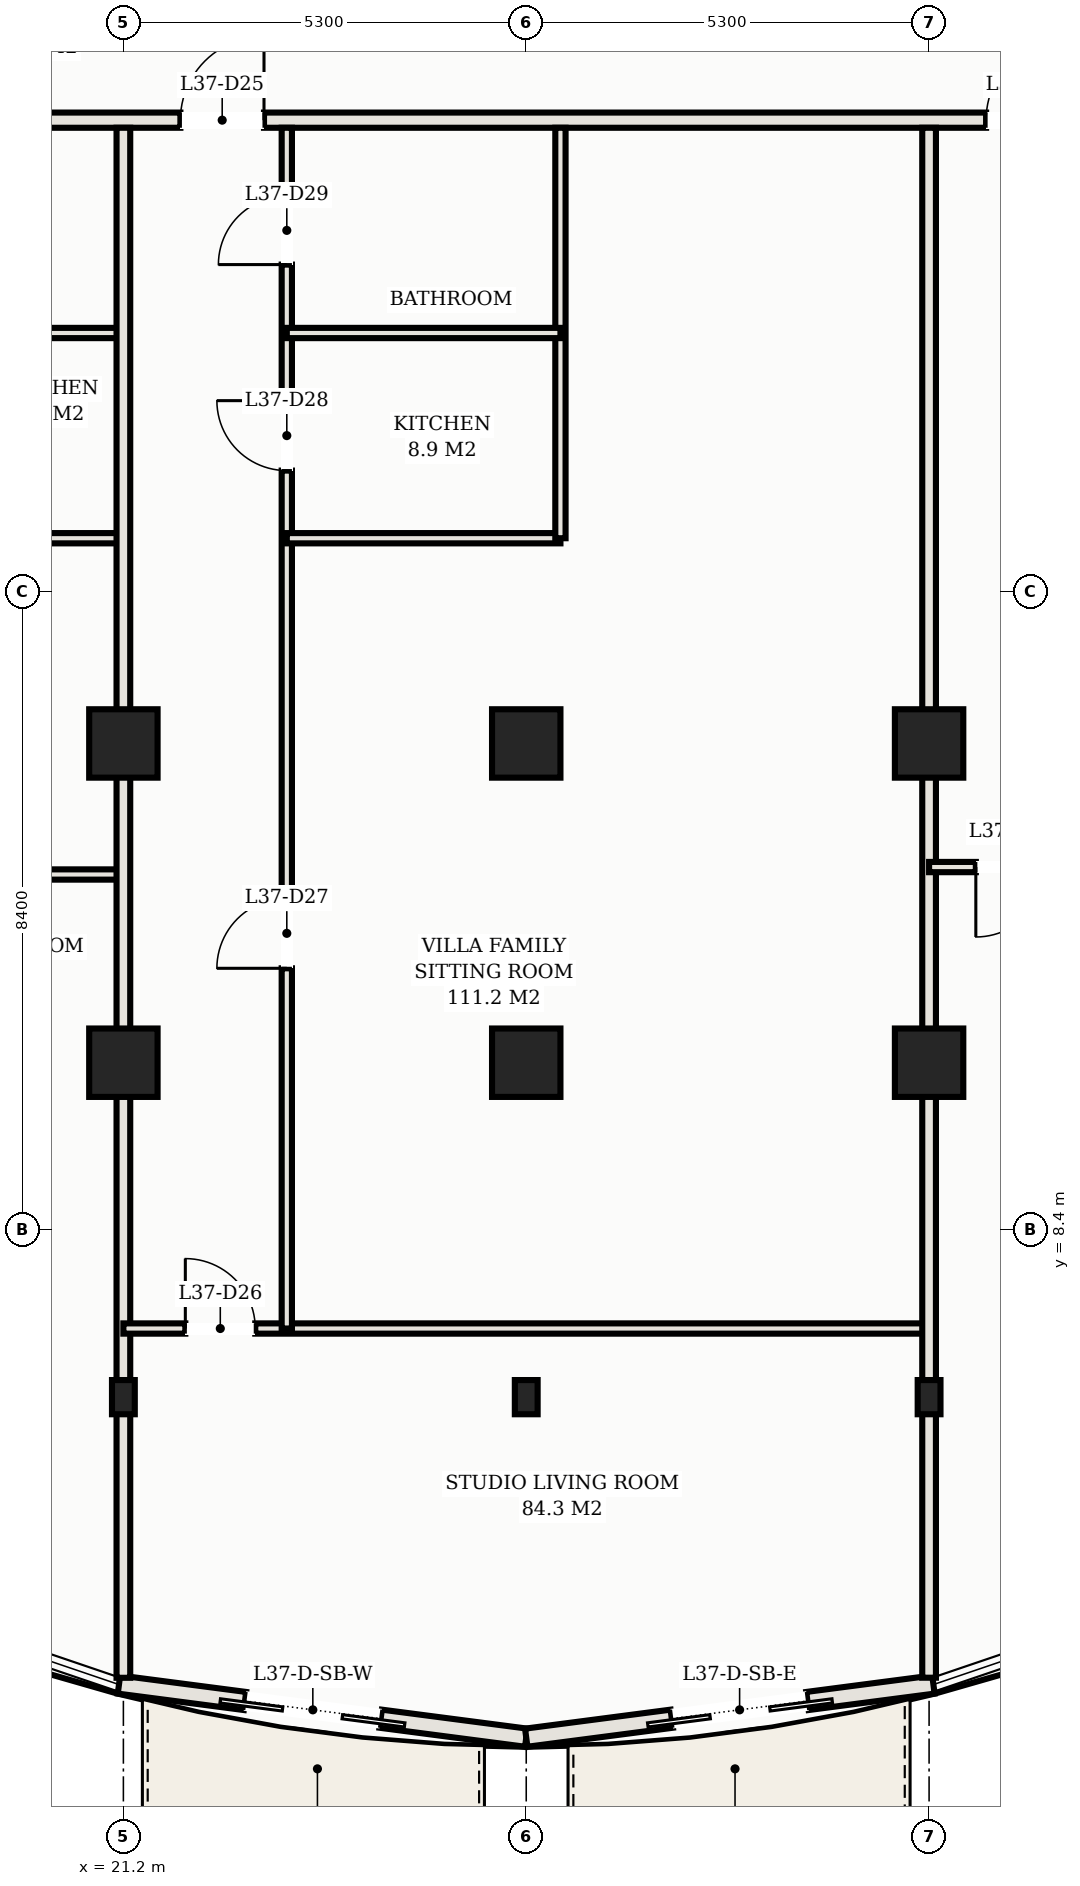
"""IFC4 building model, lengths in metres.
Left out: names, types, materials, properties, quantities, classifications, styles, units other than length and angle.
Written with IfcOpenShell. Run it as: python <this file> out.ifc"""

import sys

from ifc_helpers import new_model, si_unit, direction, frame, frame_2d, origin, origin_2d, place, context, subcontext, project, spatial, rectangle, hollow_rectangle, extrude, element, fill, save


model = new_model("IFC4")
c1 = context("Model", 3, precision=1e-05, world=origin(), true_north=direction((0.0, 1.0)))
c2 = subcontext(c1, "Body", "Model", "MODEL_VIEW")
j1 = project(units=[si_unit("LENGTHUNIT", "METRE"), si_unit("PLANEANGLEUNIT", "RADIAN")], contexts=[c1])
p1 = place(None, origin())
s1 = spatial("IfcSite", under=j1, at=p1, CompositionType="ELEMENT")
p2 = place(p1, origin())
s2 = spatial("IfcBuilding", under=s1, at=p2, CompositionType="ELEMENT")
p3 = place(p2, frame((0.0, 0.0, 139.2)))
s3 = spatial("IfcBuildingStorey", under=s2, at=p3, CompositionType="ELEMENT", Elevation=139.2)
for number, where, z_axis, x_axis in (
    (1, (21.2, 14.8, 0.0), (0.0, 0.0, 1.0), (1.0, 0.0, 0.0)),
    (2, (21.2, 10.6, 0.0), (0.0, 0.0, 1.0), (1.0, 0.0, 0.0)),
    (3, (26.5, 14.8, 0.0), (0.0, 0.0, 1.0), (1.0, 0.0, 0.0)),
    (4, (26.5, 10.6, 0.0), (0.0, 0.0, 1.0), (1.0, 0.0, 0.0)),
    (5, (31.8, 14.8, 0.0), (0.0, 0.0, 1.0), (1.0, 0.0, 0.0)),
    (6, (31.8, 10.6, 0.0), (0.0, 0.0, 1.0), (1.0, 0.0, 0.0)),
):
    element("IfcColumn", number, at=place(p3, frame(where, z_axis=z_axis, x_axis=x_axis)), inside=s3, PredefinedType="COLUMN", context=c2, shape_type="SweptSolid", body=[
        extrude(hollow_rectangle(XDim=0.9, YDim=0.9, WallThickness=0.032, at=origin_2d()), origin(), (0.0, 0.0, 1.0), 3.3),
    ])
for number, where, z_axis, x_axis in (
    (7, (21.2, 6.2, 0.0), (0.0, 0.0, 1.0), (1.0, 0.0, 0.0)),
    (8, (26.5, 6.2, 0.0), (0.0, 0.0, 1.0), (1.0, 0.0, 0.0)),
    (9, (31.8, 6.2, 0.0), (0.0, 0.0, 1.0), (1.0, 0.0, 0.0)),
):
    element("IfcColumn", number, at=place(p3, frame(where, z_axis=z_axis, x_axis=x_axis)), inside=s3, PredefinedType="COLUMN", context=c2, shape_type="SweptSolid", body=[
        extrude(hollow_rectangle(XDim=0.3, YDim=0.45, WallThickness=0.016, at=origin_2d()), origin(), (0.0, 0.0, 1.0), 3.3),
    ])
p4 = place(p3, frame((21.142, 2.419, 0.0), z_axis=(0.0, 0.0, 1.0), x_axis=(0.991597639478, -0.129360432053, 0.0)))
e10 = element("IfcWall", 10, at=p4, inside=s3, PredefinedType="SOLIDWALL", context=c2, shape_type="SweptSolid", body=[
    extrude(rectangle(XDim=5.403, YDim=0.24, at=frame_2d((2.702, 0.0))), origin(), (0.0, 0.0, 1.0), 3.1),
])
p5 = place(p4, frame((1.672, 0.0, 0.0)))
e11 = element("IfcOpeningElement", 11, at=p5, cuts=e10, PredefinedType="OPENING", context=c2, shape_type="SweptSolid", body=[
    extrude(rectangle(XDim=1.8, YDim=2.2, at=frame_2d((0.9, 1.1))), frame((0.0, 0.13, 0.0), z_axis=(0.0, -1.0, 0.0), x_axis=(1.0, 0.0, 0.0)), (0.0, 0.0, 1.0), 0.26),
])
p6 = place(p3, frame((26.5, 1.72, 0.0), z_axis=(0.0, 0.0, 1.0), x_axis=(0.991594614239, 0.129383619568, 0.0)))
e12 = element("IfcWall", 12, at=p6, inside=s3, PredefinedType="SOLIDWALL", context=c2, shape_type="SweptSolid", body=[
    extrude(rectangle(XDim=5.402, YDim=0.24, at=frame_2d((2.701, 0.0))), origin(), (0.0, 0.0, 1.0), 3.1),
])
p7 = place(p6, frame((1.931, 0.0, 0.0)))
e13 = element("IfcOpeningElement", 13, at=p7, cuts=e12, PredefinedType="OPENING", context=c2, shape_type="SweptSolid", body=[
    extrude(rectangle(XDim=1.8, YDim=2.2, at=frame_2d((0.9, 1.1))), frame((0.0, 0.13, 0.0), z_axis=(0.0, -1.0, 0.0), x_axis=(1.0, 0.0, 0.0)), (0.0, 0.0, 1.0), 0.26),
])
p8 = place(p3, frame((4.32, 23.0, 0.0), z_axis=(0.0, 0.0, 1.0), x_axis=(1.0, 0.0, 0.0)))
e14 = element("IfcWall", 14, at=p8, inside=s3, PredefinedType="PARTITIONING", context=c2, shape_type="SweptSolid", body=[
    extrude(rectangle(XDim=44.36, YDim=0.2, at=frame_2d((22.18, 0.0))), origin(), (0.0, 0.0, 1.0), 2.38),
])
p9 = place(p8, frame((7.03, 0.0, 0.0)))
e15 = element("IfcOpeningElement", 15, at=p9, cuts=e14, PredefinedType="OPENING", context=c2, shape_type="SweptSolid", body=[
    extrude(rectangle(XDim=1.1, YDim=2.25, at=frame_2d((0.55, 1.125))), frame((0.0, 0.11, 0.0), z_axis=(0.0, -1.0, 0.0), x_axis=(1.0, 0.0, 0.0)), (0.0, 0.0, 1.0), 0.22),
])
p10 = place(p8, frame((12.83, 0.0, 0.0)))
e16 = element("IfcOpeningElement", 16, at=p10, cuts=e14, PredefinedType="OPENING", context=c2, shape_type="SweptSolid", body=[
    extrude(rectangle(XDim=1.1, YDim=2.25, at=frame_2d((0.55, 1.125))), frame((0.0, 0.11, 0.0), z_axis=(0.0, -1.0, 0.0), x_axis=(1.0, 0.0, 0.0)), (0.0, 0.0, 1.0), 0.22),
])
p11 = place(p8, frame((17.63, 0.0, 0.0)))
e17 = element("IfcOpeningElement", 17, at=p11, cuts=e14, PredefinedType="OPENING", context=c2, shape_type="SweptSolid", body=[
    extrude(rectangle(XDim=1.1, YDim=2.25, at=frame_2d((0.55, 1.125))), frame((0.0, 0.11, 0.0), z_axis=(0.0, -1.0, 0.0), x_axis=(1.0, 0.0, 0.0)), (0.0, 0.0, 1.0), 0.22),
])
p12 = place(p8, frame((28.23, 0.0, 0.0)))
e18 = element("IfcOpeningElement", 18, at=p12, cuts=e14, PredefinedType="OPENING", context=c2, shape_type="SweptSolid", body=[
    extrude(rectangle(XDim=1.1, YDim=2.25, at=frame_2d((0.55, 1.125))), frame((0.0, 0.11, 0.0), z_axis=(0.0, -1.0, 0.0), x_axis=(1.0, 0.0, 0.0)), (0.0, 0.0, 1.0), 0.22),
])
p13 = place(p8, frame((2.635, 0.0, 0.0)))
e19 = element("IfcOpeningElement", 19, at=p13, cuts=e14, PredefinedType="OPENING", context=c2, shape_type="SweptSolid", body=[
    extrude(rectangle(XDim=0.92, YDim=2.15, at=frame_2d((0.46, 1.075))), frame((0.0, 0.11, 0.0), z_axis=(0.0, -1.0, 0.0), x_axis=(1.0, 0.0, 0.0)), (0.0, 0.0, 1.0), 0.22),
])
p14 = place(p8, frame((40.805, 0.0, 0.0)))
e20 = element("IfcOpeningElement", 20, at=p14, cuts=e14, PredefinedType="OPENING", context=c2, shape_type="SweptSolid", body=[
    extrude(rectangle(XDim=0.92, YDim=2.15, at=frame_2d((0.46, 1.075))), frame((0.0, 0.11, 0.0), z_axis=(0.0, -1.0, 0.0), x_axis=(1.0, 0.0, 0.0)), (0.0, 0.0, 1.0), 0.22),
])
p15 = place(p3, frame((16.4, 13.076, 0.0), z_axis=(0.0, 0.0, 1.0), x_axis=(1.0, 0.0, 0.0)))
e21 = element("IfcWall", 21, at=p15, inside=s3, PredefinedType="PARTITIONING", context=c2, shape_type="SweptSolid", body=[
    extrude(rectangle(XDim=4.8, YDim=0.135, at=frame_2d((2.4, 0.0))), origin(), (0.0, 0.0, 1.0), 2.38),
])
p16 = place(p15, frame((0.615, 0.0, 0.0)))
e22 = element("IfcOpeningElement", 22, at=p16, cuts=e21, PredefinedType="OPENING", context=c2, shape_type="SweptSolid", body=[
    extrude(rectangle(XDim=0.92, YDim=2.15, at=frame_2d((0.46, 1.075))), frame((0.0, 0.078, 0.0), z_axis=(0.0, -1.0, 0.0), x_axis=(1.0, 0.0, 0.0)), (0.0, 0.0, 1.0), 0.155),
])
for number, where, z_axis, x_axis in (
    (23, (18.55, 17.5, 0.0), (0.0, 0.0, 1.0), (1.0, 0.0, 0.0)),
    (24, (18.55, 20.2, 0.0), (0.0, 0.0, 1.0), (1.0, 0.0, 0.0)),
):
    element("IfcWall", number, at=place(p3, frame(where, z_axis=z_axis, x_axis=x_axis)), inside=s3, PredefinedType="PARTITIONING", context=c2, shape_type="SweptSolid", body=[
        extrude(rectangle(XDim=2.65, YDim=0.135, at=frame_2d((1.325, 0.0))), origin(), (0.0, 0.0, 1.0), 2.38),
    ])
p17 = place(p3, frame((21.2, 2.508, 0.0), z_axis=(0.0, 0.0, 1.0), x_axis=(0.0, 1.0, 0.0)))
e25 = element("IfcWall", 25, at=p17, inside=s3, PredefinedType="PARTITIONING", context=c2, shape_type="SweptSolid", body=[
    extrude(rectangle(XDim=20.392, YDim=0.18, at=frame_2d((10.196, 0.0))), origin(), (0.0, 0.0, 1.0), 2.38),
])
p18 = place(p3, frame((21.2, 7.103, 0.0), z_axis=(0.0, 0.0, 1.0), x_axis=(1.0, 0.0, 0.0)))
e26 = element("IfcWall", 26, at=p18, inside=s3, PredefinedType="PARTITIONING", context=c2, shape_type="SweptSolid", body=[
    extrude(rectangle(XDim=10.6, YDim=0.135, at=frame_2d((5.3, 0.0))), origin(), (0.0, 0.0, 1.0), 2.38),
])
p19 = place(p18, frame((0.815, 0.0, 0.0)))
e27 = element("IfcOpeningElement", 27, at=p19, cuts=e26, PredefinedType="OPENING", context=c2, shape_type="SweptSolid", body=[
    extrude(rectangle(XDim=0.92, YDim=2.15, at=frame_2d((0.46, 1.075))), frame((0.0, 0.078, 0.0), z_axis=(0.0, -1.0, 0.0), x_axis=(1.0, 0.0, 0.0)), (0.0, 0.0, 1.0), 0.155),
])
p20 = place(p3, frame((23.35, 7.103, 0.0), z_axis=(0.0, 0.0, 1.0), x_axis=(0.0, 1.0, 0.0)))
e28 = element("IfcWall", 28, at=p20, inside=s3, PredefinedType="PARTITIONING", context=c2, shape_type="SweptSolid", body=[
    extrude(rectangle(XDim=15.797, YDim=0.135, at=frame_2d((7.898, 0.0))), origin(), (0.0, 0.0, 1.0), 2.38),
])
p21 = place(p20, frame((4.739, 0.0, 0.0)))
e29 = element("IfcOpeningElement", 29, at=p21, cuts=e28, PredefinedType="OPENING", context=c2, shape_type="SweptSolid", body=[
    extrude(rectangle(XDim=0.92, YDim=2.15, at=frame_2d((0.46, 1.075))), frame((0.0, 0.078, 0.0), z_axis=(0.0, -1.0, 0.0), x_axis=(1.0, 0.0, 0.0)), (0.0, 0.0, 1.0), 0.155),
])
p22 = place(p20, frame((11.287, 0.0, 0.0)))
e30 = element("IfcOpeningElement", 30, at=p22, cuts=e28, PredefinedType="OPENING", context=c2, shape_type="SweptSolid", body=[
    extrude(rectangle(XDim=0.92, YDim=2.15, at=frame_2d((0.46, 1.075))), frame((0.0, 0.078, 0.0), z_axis=(0.0, -1.0, 0.0), x_axis=(1.0, 0.0, 0.0)), (0.0, 0.0, 1.0), 0.155),
])
p23 = place(p20, frame((13.997, 0.0, 0.0)))
e31 = element("IfcOpeningElement", 31, at=p23, cuts=e28, PredefinedType="OPENING", context=c2, shape_type="SweptSolid", body=[
    extrude(rectangle(XDim=0.9, YDim=2.15, at=frame_2d((0.45, 1.075))), frame((0.0, 0.078, 0.0), z_axis=(0.0, -1.0, 0.0), x_axis=(1.0, 0.0, 0.0)), (0.0, 0.0, 1.0), 0.155),
])
p24 = place(p3, frame((23.35, 17.5, 0.0), z_axis=(0.0, 0.0, 1.0), x_axis=(1.0, 0.0, 0.0)))
e32 = element("IfcWall", 32, at=p24, inside=s3, PredefinedType="PARTITIONING", context=c2, shape_type="SweptSolid", body=[
    extrude(rectangle(XDim=3.6, YDim=0.135, at=frame_2d((1.8, 0.0))), origin(), (0.0, 0.0, 1.0), 2.38),
])
p25 = place(p3, frame((26.95, 17.5, 0.0), z_axis=(0.0, 0.0, 1.0), x_axis=(0.0, 1.0, 0.0)))
e33 = element("IfcWall", 33, at=p25, inside=s3, PredefinedType="PARTITIONING", context=c2, shape_type="SweptSolid", body=[
    extrude(rectangle(XDim=5.4, YDim=0.135, at=frame_2d((2.7, 0.0))), origin(), (0.0, 0.0, 1.0), 2.38),
])
p26 = place(p3, frame((23.35, 20.2, 0.0), z_axis=(0.0, 0.0, 1.0), x_axis=(1.0, 0.0, 0.0)))
e34 = element("IfcWall", 34, at=p26, inside=s3, PredefinedType="PARTITIONING", context=c2, shape_type="SweptSolid", body=[
    extrude(rectangle(XDim=3.6, YDim=0.135, at=frame_2d((1.8, 0.0))), origin(), (0.0, 0.0, 1.0), 2.38),
])
p27 = place(p3, frame((31.8, 2.509, 0.0), z_axis=(0.0, 0.0, 1.0), x_axis=(0.0, 1.0, 0.0)))
e35 = element("IfcWall", 35, at=p27, inside=s3, PredefinedType="PARTITIONING", context=c2, shape_type="SweptSolid", body=[
    extrude(rectangle(XDim=20.391, YDim=0.18, at=frame_2d((10.195, 0.0))), origin(), (0.0, 0.0, 1.0), 2.38),
])
p28 = place(p3, frame((31.8, 13.174, 0.0), z_axis=(0.0, 0.0, 1.0), x_axis=(1.0, 0.0, 0.0)))
e36 = element("IfcWall", 36, at=p28, inside=s3, PredefinedType="PARTITIONING", context=c2, shape_type="SweptSolid", body=[
    extrude(rectangle(XDim=5.3, YDim=0.135, at=frame_2d((2.65, 0.0))), origin(), (0.0, 0.0, 1.0), 2.38),
])
p29 = place(p28, frame((0.615, 0.0, 0.0)))
e37 = element("IfcOpeningElement", 37, at=p29, cuts=e36, PredefinedType="OPENING", context=c2, shape_type="SweptSolid", body=[
    extrude(rectangle(XDim=0.92, YDim=2.15, at=frame_2d((0.46, 1.075))), frame((0.0, 0.078, 0.0), z_axis=(0.0, -1.0, 0.0), x_axis=(1.0, 0.0, 0.0)), (0.0, 0.0, 1.0), 0.155),
])
p30 = place(p5, frame((1.8, 0.0, 0.0), z_axis=(0.0, 0.0, 1.0), x_axis=(-1.0, 0.0, 0.0)))
e38 = element("IfcDoor", 38, at=p30, inside=s3, OperationType="DOUBLE_DOOR_SLIDING", PredefinedType="DOOR", context=c2, shape_type="SweptSolid", body=[
    extrude(rectangle(XDim=1.8, YDim=2.2, at=frame_2d((0.9, 1.1))), frame((0.0, 0.025, 0.0), z_axis=(0.0, -1.0, 0.0), x_axis=(1.0, 0.0, 0.0)), (0.0, 0.0, 1.0), 0.05),
])
fill(e11, e38)
p31 = place(p7, frame((1.8, 0.0, 0.0), z_axis=(0.0, 0.0, 1.0), x_axis=(-1.0, 0.0, 0.0)))
e39 = element("IfcDoor", 39, at=p31, inside=s3, OperationType="DOUBLE_DOOR_SLIDING", PredefinedType="DOOR", context=c2, shape_type="SweptSolid", body=[
    extrude(rectangle(XDim=1.8, YDim=2.2, at=frame_2d((0.9, 1.1))), frame((0.0, 0.025, 0.0), z_axis=(0.0, -1.0, 0.0), x_axis=(1.0, 0.0, 0.0)), (0.0, 0.0, 1.0), 0.05),
])
fill(e13, e39)
p32 = place(p11, origin())
e40 = element("IfcDoor", 40, at=p32, inside=s3, OperationType="SINGLE_SWING_RIGHT", PredefinedType="DOOR", context=c2, shape_type="SweptSolid", body=[
    extrude(rectangle(XDim=1.1, YDim=2.25, at=frame_2d((0.55, 1.125))), frame((0.0, 0.025, 0.0), z_axis=(0.0, -1.0, 0.0), x_axis=(1.0, 0.0, 0.0)), (0.0, 0.0, 1.0), 0.05),
])
fill(e17, e40)
p33 = place(p19, origin())
e41 = element("IfcDoor", 41, at=p33, inside=s3, OperationType="SINGLE_SWING_LEFT", PredefinedType="DOOR", context=c2, shape_type="SweptSolid", body=[
    extrude(rectangle(XDim=0.92, YDim=2.15, at=frame_2d((0.46, 1.075))), frame((0.0, 0.025, 0.0), z_axis=(0.0, -1.0, 0.0), x_axis=(1.0, 0.0, 0.0)), (0.0, 0.0, 1.0), 0.05),
])
fill(e27, e41)
p34 = place(p21, origin())
e42 = element("IfcDoor", 42, at=p34, inside=s3, OperationType="SINGLE_SWING_LEFT", PredefinedType="DOOR", context=c2, shape_type="SweptSolid", body=[
    extrude(rectangle(XDim=0.92, YDim=2.15, at=frame_2d((0.46, 1.075))), frame((0.0, 0.025, 0.0), z_axis=(0.0, -1.0, 0.0), x_axis=(1.0, 0.0, 0.0)), (0.0, 0.0, 1.0), 0.05),
])
fill(e29, e42)
p35 = place(p22, origin())
e43 = element("IfcDoor", 43, at=p35, inside=s3, OperationType="SINGLE_SWING_RIGHT", PredefinedType="DOOR", context=c2, shape_type="SweptSolid", body=[
    extrude(rectangle(XDim=0.92, YDim=2.15, at=frame_2d((0.46, 1.075))), frame((0.0, 0.025, 0.0), z_axis=(0.0, -1.0, 0.0), x_axis=(1.0, 0.0, 0.0)), (0.0, 0.0, 1.0), 0.05),
])
fill(e30, e43)
p36 = place(p23, origin())
e44 = element("IfcDoor", 44, at=p36, inside=s3, OperationType="SINGLE_SWING_LEFT", PredefinedType="DOOR", context=c2, shape_type="SweptSolid", body=[
    extrude(rectangle(XDim=0.9, YDim=2.15, at=frame_2d((0.45, 1.075))), frame((0.0, 0.025, 0.0), z_axis=(0.0, -1.0, 0.0), x_axis=(1.0, 0.0, 0.0)), (0.0, 0.0, 1.0), 0.05),
])
fill(e31, e44)
p37 = place(p12, origin())
e45 = element("IfcDoor", 45, at=p37, inside=s3, OperationType="SINGLE_SWING_RIGHT", PredefinedType="DOOR", context=c2, shape_type="SweptSolid", body=[
    extrude(rectangle(XDim=1.1, YDim=2.25, at=frame_2d((0.55, 1.125))), frame((0.0, 0.025, 0.0), z_axis=(0.0, -1.0, 0.0), x_axis=(1.0, 0.0, 0.0)), (0.0, 0.0, 1.0), 0.05),
])
fill(e18, e45)
p38 = place(p29, frame((0.92, 0.0, 0.0), z_axis=(0.0, 0.0, 1.0), x_axis=(-1.0, 0.0, 0.0)))
e46 = element("IfcDoor", 46, at=p38, inside=s3, OperationType="SINGLE_SWING_RIGHT", PredefinedType="DOOR", context=c2, shape_type="SweptSolid", body=[
    extrude(rectangle(XDim=0.92, YDim=2.15, at=frame_2d((0.46, 1.075))), frame((0.0, 0.025, 0.0), z_axis=(0.0, -1.0, 0.0), x_axis=(1.0, 0.0, 0.0)), (0.0, 0.0, 1.0), 0.05),
])
fill(e37, e46)
save(model, sys.argv[1])
